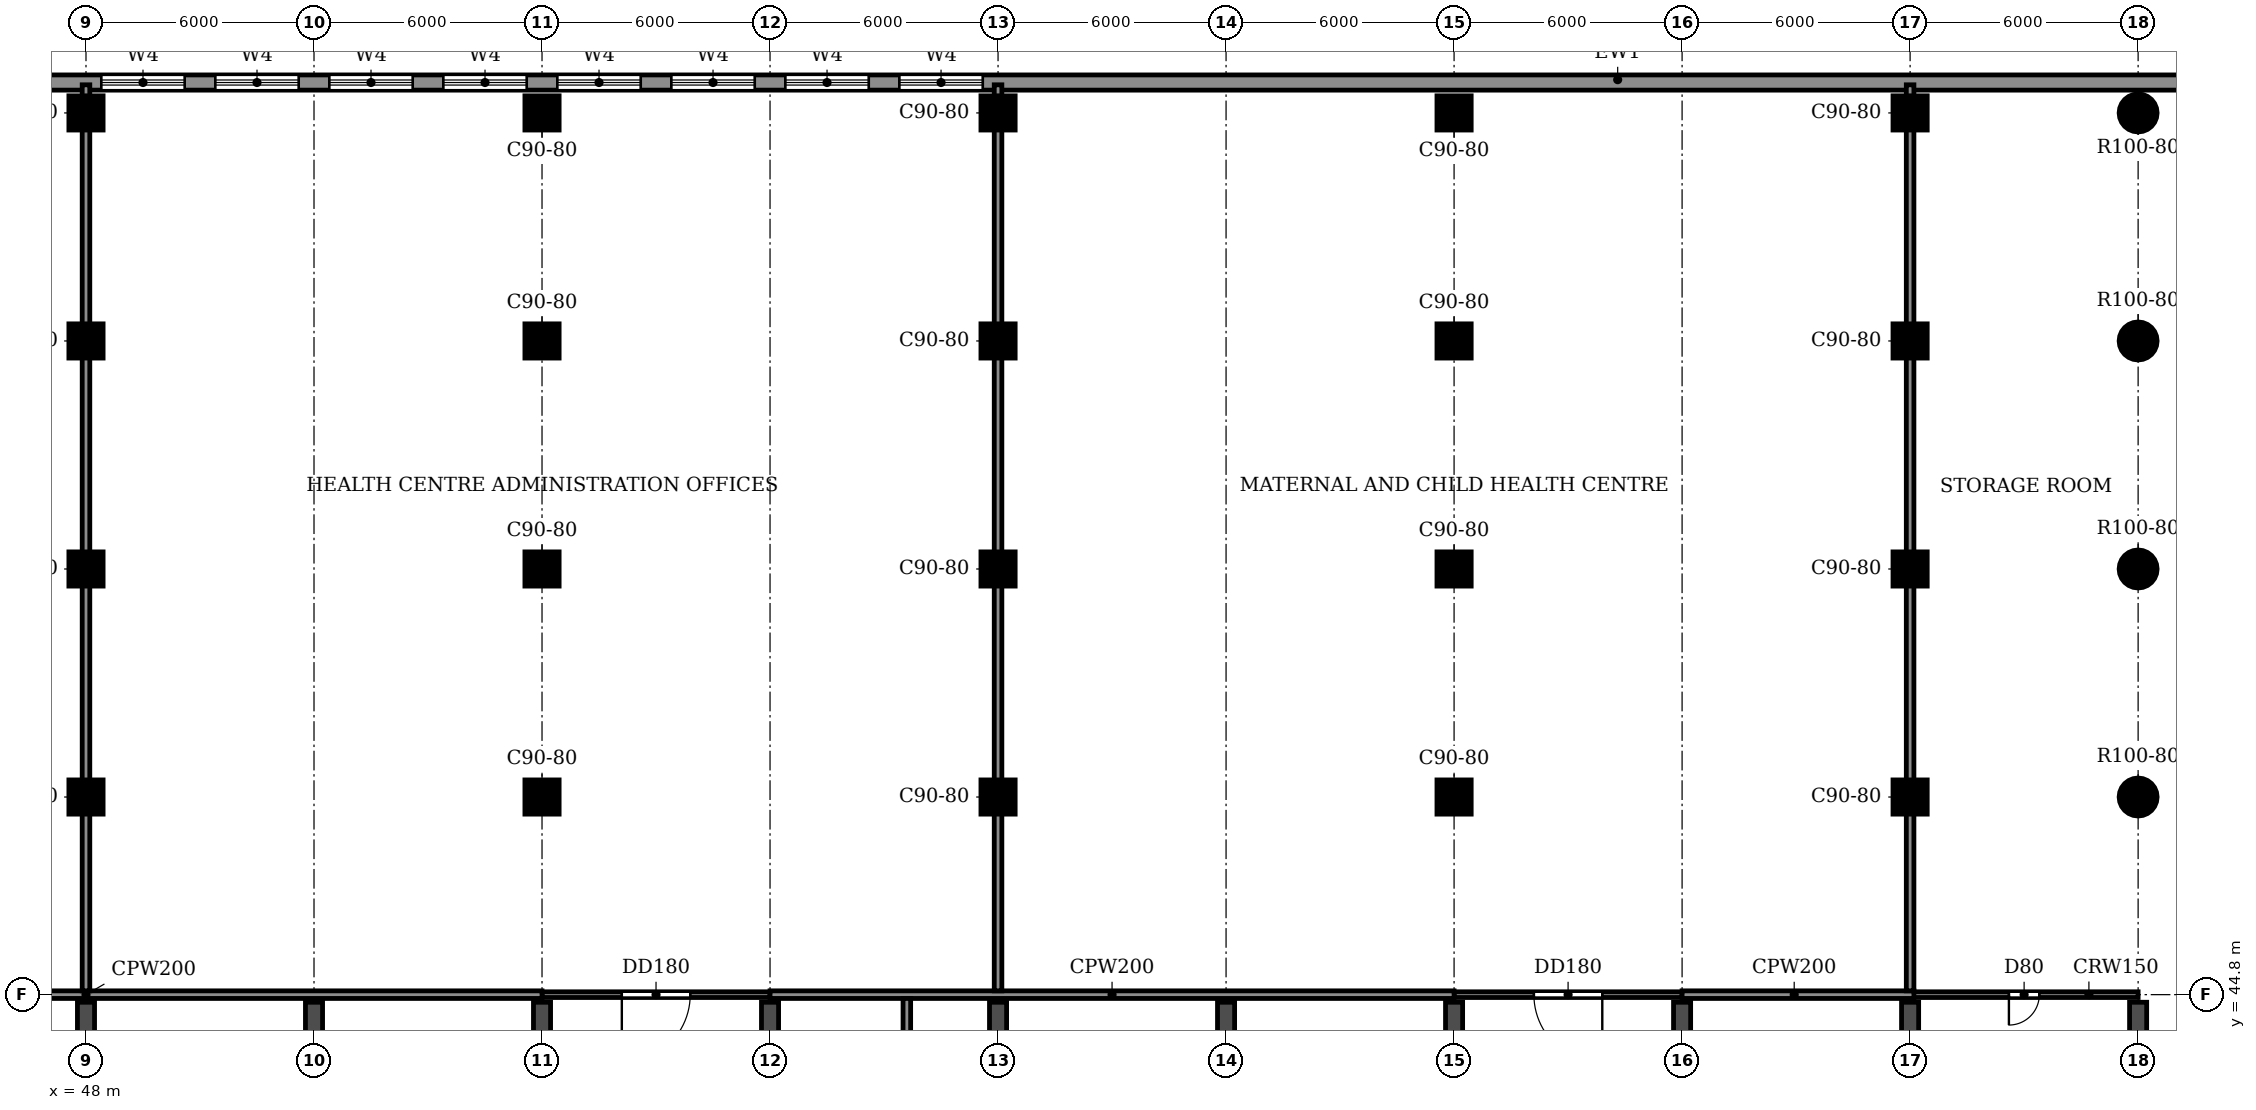
"""IFC4 building model, lengths in metres.
Left out: names, types, materials, properties, quantities, classifications, styles, units other than length and angle.
Written with IfcOpenShell. Run it as: python <this file> out.ifc"""

import sys

from ifc_helpers import new_model, si_unit, direction, frame, frame_2d, origin, origin_2d, place, context, subcontext, project, spatial, rectangle, circle, extrude, source, transform, mapped, element, fill, save


model = new_model("IFC4")
c1 = context("Model", 3, precision=1e-05, world=origin(), true_north=direction((0.0, 1.0)))
c2 = subcontext(c1, "Body", "Model", "MODEL_VIEW")
j1 = project(units=[si_unit("LENGTHUNIT", "METRE"), si_unit("PLANEANGLEUNIT", "RADIAN")], contexts=[c1])
p1 = place(None, origin())
s1 = spatial("IfcSite", under=j1, at=p1, CompositionType="ELEMENT")
p2 = place(p1, origin())
s2 = spatial("IfcBuilding", under=s1, at=p2, CompositionType="ELEMENT")
p3 = place(p2, frame((0.0, 0.0, 6.0)))
s3 = spatial("IfcBuildingStorey", under=s2, at=p3, CompositionType="ELEMENT", Elevation=6.0)
for number, where, z_axis, x_axis in (
    (1, (48.0, 30.55, 0.0), (0.0, 0.0, 1.0), (0.0, 1.0, 0.0)),
    (2, (54.0, 30.55, 0.0), (0.0, 0.0, 1.0), (0.0, 1.0, 0.0)),
    (3, (60.0, 30.55, 0.0), (0.0, 0.0, 1.0), (0.0, 1.0, 0.0)),
    (4, (66.0, 30.55, 0.0), (0.0, 0.0, 1.0), (0.0, 1.0, 0.0)),
    (5, (72.0, 30.55, 0.0), (0.0, 0.0, 1.0), (0.0, 1.0, 0.0)),
    (6, (78.0, 30.55, 0.0), (0.0, 0.0, 1.0), (0.0, 1.0, 0.0)),
    (7, (84.0, 30.55, 0.0), (0.0, 0.0, 1.0), (0.0, 1.0, 0.0)),
    (8, (90.0, 30.55, 0.0), (0.0, 0.0, 1.0), (0.0, 1.0, 0.0)),
    (9, (96.0, 30.55, 0.0), (0.0, 0.0, 1.0), (0.0, 1.0, 0.0)),
    (10, (102.0, 30.55, 0.0), (0.0, 0.0, 1.0), (0.0, 1.0, 0.0)),
):
    element("IfcWall", number, at=place(p3, frame(where, z_axis=z_axis, x_axis=x_axis)), inside=s3, PredefinedType="SHEAR", context=c2, shape_type="SweptSolid", body=[
        extrude(rectangle(XDim=14.05, YDim=0.45, at=frame_2d((7.025, 0.0))), origin(), (0.0, 0.0, 1.0), 4.52),
    ])
m1 = source(origin(), c2, "Body", "SweptSolid", [
    extrude(rectangle(XDim=0.9, YDim=0.9, at=origin_2d()), origin(), (0.0, 0.0, 1.0), 4.52),
])
for number, where, z_axis, x_axis in (
    (11, (48.0, 68.0, 0.0), (0.0, 0.0, 1.0), (1.0, 0.0, 0.0)),
    (12, (60.0, 68.0, 0.0), (0.0, 0.0, 1.0), (1.0, 0.0, 0.0)),
    (13, (72.0, 68.0, 0.0), (0.0, 0.0, 1.0), (1.0, 0.0, 0.0)),
    (14, (84.0, 68.0, 0.0), (0.0, 0.0, 1.0), (1.0, 0.0, 0.0)),
    (15, (96.0, 68.0, 0.0), (0.0, 0.0, 1.0), (1.0, 0.0, 0.0)),
):
    element("IfcColumn", number, at=place(p3, frame(where, z_axis=z_axis, x_axis=x_axis)), inside=s3, PredefinedType="COLUMN", context=c2, shape_type="MappedRepresentation", body=[
        mapped(m1, transform((0.0, 0.0, 0.0))),
    ])
m2 = source(origin(), c2, "Body", "SweptSolid", [
    extrude(circle(Radius=0.5, at=origin_2d()), origin(), (0.0, 0.0, 1.0), 4.52),
])
p4 = place(p3, frame((102.0, 68.0, 0.0), z_axis=(0.0, 0.0, 1.0), x_axis=(1.0, 0.0, 0.0)))
e16 = element("IfcColumn", 16, at=p4, inside=s3, PredefinedType="COLUMN", context=c2, shape_type="MappedRepresentation", body=[
    mapped(m2, transform((0.0, 0.0, 0.0))),
])
for number, where, z_axis, x_axis in (
    (17, (48.0, 62.0, 0.0), (0.0, 0.0, 1.0), (1.0, 0.0, 0.0)),
    (18, (60.0, 62.0, 0.0), (0.0, 0.0, 1.0), (1.0, 0.0, 0.0)),
    (19, (72.0, 62.0, 0.0), (0.0, 0.0, 1.0), (1.0, 0.0, 0.0)),
    (20, (84.0, 62.0, 0.0), (0.0, 0.0, 1.0), (1.0, 0.0, 0.0)),
    (21, (96.0, 62.0, 0.0), (0.0, 0.0, 1.0), (1.0, 0.0, 0.0)),
):
    element("IfcColumn", number, at=place(p3, frame(where, z_axis=z_axis, x_axis=x_axis)), inside=s3, PredefinedType="COLUMN", context=c2, shape_type="MappedRepresentation", body=[
        mapped(m1, transform((0.0, 0.0, 0.0))),
    ])
p5 = place(p3, frame((102.0, 62.0, 0.0), z_axis=(0.0, 0.0, 1.0), x_axis=(1.0, 0.0, 0.0)))
e22 = element("IfcColumn", 22, at=p5, inside=s3, PredefinedType="COLUMN", context=c2, shape_type="MappedRepresentation", body=[
    mapped(m2, transform((0.0, 0.0, 0.0))),
])
for number, where, z_axis, x_axis in (
    (23, (48.0, 56.0, 0.0), (0.0, 0.0, 1.0), (1.0, 0.0, 0.0)),
    (24, (60.0, 56.0, 0.0), (0.0, 0.0, 1.0), (1.0, 0.0, 0.0)),
    (25, (72.0, 56.0, 0.0), (0.0, 0.0, 1.0), (1.0, 0.0, 0.0)),
    (26, (84.0, 56.0, 0.0), (0.0, 0.0, 1.0), (1.0, 0.0, 0.0)),
    (27, (96.0, 56.0, 0.0), (0.0, 0.0, 1.0), (1.0, 0.0, 0.0)),
):
    element("IfcColumn", number, at=place(p3, frame(where, z_axis=z_axis, x_axis=x_axis)), inside=s3, PredefinedType="COLUMN", context=c2, shape_type="MappedRepresentation", body=[
        mapped(m1, transform((0.0, 0.0, 0.0))),
    ])
p6 = place(p3, frame((102.0, 56.0, 0.0), z_axis=(0.0, 0.0, 1.0), x_axis=(1.0, 0.0, 0.0)))
e28 = element("IfcColumn", 28, at=p6, inside=s3, PredefinedType="COLUMN", context=c2, shape_type="MappedRepresentation", body=[
    mapped(m2, transform((0.0, 0.0, 0.0))),
])
for number, where, z_axis, x_axis in (
    (29, (48.0, 50.0, 0.0), (0.0, 0.0, 1.0), (1.0, 0.0, 0.0)),
    (30, (60.0, 50.0, 0.0), (0.0, 0.0, 1.0), (1.0, 0.0, 0.0)),
    (31, (72.0, 50.0, 0.0), (0.0, 0.0, 1.0), (1.0, 0.0, 0.0)),
    (32, (84.0, 50.0, 0.0), (0.0, 0.0, 1.0), (1.0, 0.0, 0.0)),
    (33, (96.0, 50.0, 0.0), (0.0, 0.0, 1.0), (1.0, 0.0, 0.0)),
):
    element("IfcColumn", number, at=place(p3, frame(where, z_axis=z_axis, x_axis=x_axis)), inside=s3, PredefinedType="COLUMN", context=c2, shape_type="MappedRepresentation", body=[
        mapped(m1, transform((0.0, 0.0, 0.0))),
    ])
p7 = place(p3, frame((102.0, 50.0, 0.0), z_axis=(0.0, 0.0, 1.0), x_axis=(1.0, 0.0, 0.0)))
e34 = element("IfcColumn", 34, at=p7, inside=s3, PredefinedType="COLUMN", context=c2, shape_type="MappedRepresentation", body=[
    mapped(m2, transform((0.0, 0.0, 0.0))),
])
p8 = place(p3, frame((105.0, 68.8, 0.0), z_axis=(0.0, 0.0, 1.0), x_axis=(-1.0, 0.0, 0.0)))
e35 = element("IfcWall", 35, at=p8, inside=s3, PredefinedType="STANDARD", context=c2, shape_type="SweptSolid", body=[
    extrude(rectangle(XDim=60.0, YDim=0.4, at=frame_2d((30.0, 0.0))), origin(), (0.0, 0.0, 1.0), 4.52),
])
p9 = place(p8, frame((54.4, 0.0, 0.9)))
e36 = element("IfcOpeningElement", 36, at=p9, cuts=e35, PredefinedType="OPENING", context=c2, shape_type="SweptSolid", body=[
    extrude(rectangle(XDim=2.2, YDim=2.7, at=frame_2d((1.1, 1.35))), frame((0.0, 0.21, 0.0), z_axis=(0.0, -1.0, 0.0), x_axis=(1.0, 0.0, 0.0)), (0.0, 0.0, 1.0), 0.42),
])
p10 = place(p8, frame((51.4, 0.0, 0.9)))
e37 = element("IfcOpeningElement", 37, at=p10, cuts=e35, PredefinedType="OPENING", context=c2, shape_type="SweptSolid", body=[
    extrude(rectangle(XDim=2.2, YDim=2.7, at=frame_2d((1.1, 1.35))), frame((0.0, 0.21, 0.0), z_axis=(0.0, -1.0, 0.0), x_axis=(1.0, 0.0, 0.0)), (0.0, 0.0, 1.0), 0.42),
])
p11 = place(p8, frame((48.4, 0.0, 0.9)))
e38 = element("IfcOpeningElement", 38, at=p11, cuts=e35, PredefinedType="OPENING", context=c2, shape_type="SweptSolid", body=[
    extrude(rectangle(XDim=2.2, YDim=2.7, at=frame_2d((1.1, 1.35))), frame((0.0, 0.21, 0.0), z_axis=(0.0, -1.0, 0.0), x_axis=(1.0, 0.0, 0.0)), (0.0, 0.0, 1.0), 0.42),
])
p12 = place(p8, frame((45.4, 0.0, 0.9)))
e39 = element("IfcOpeningElement", 39, at=p12, cuts=e35, PredefinedType="OPENING", context=c2, shape_type="SweptSolid", body=[
    extrude(rectangle(XDim=2.2, YDim=2.7, at=frame_2d((1.1, 1.35))), frame((0.0, 0.21, 0.0), z_axis=(0.0, -1.0, 0.0), x_axis=(1.0, 0.0, 0.0)), (0.0, 0.0, 1.0), 0.42),
])
p13 = place(p8, frame((42.4, 0.0, 0.9)))
e40 = element("IfcOpeningElement", 40, at=p13, cuts=e35, PredefinedType="OPENING", context=c2, shape_type="SweptSolid", body=[
    extrude(rectangle(XDim=2.2, YDim=2.7, at=frame_2d((1.1, 1.35))), frame((0.0, 0.21, 0.0), z_axis=(0.0, -1.0, 0.0), x_axis=(1.0, 0.0, 0.0)), (0.0, 0.0, 1.0), 0.42),
])
p14 = place(p8, frame((39.4, 0.0, 0.9)))
e41 = element("IfcOpeningElement", 41, at=p14, cuts=e35, PredefinedType="OPENING", context=c2, shape_type="SweptSolid", body=[
    extrude(rectangle(XDim=2.2, YDim=2.7, at=frame_2d((1.1, 1.35))), frame((0.0, 0.21, 0.0), z_axis=(0.0, -1.0, 0.0), x_axis=(1.0, 0.0, 0.0)), (0.0, 0.0, 1.0), 0.42),
])
p15 = place(p8, frame((36.4, 0.0, 0.9)))
e42 = element("IfcOpeningElement", 42, at=p15, cuts=e35, PredefinedType="OPENING", context=c2, shape_type="SweptSolid", body=[
    extrude(rectangle(XDim=2.2, YDim=2.7, at=frame_2d((1.1, 1.35))), frame((0.0, 0.21, 0.0), z_axis=(0.0, -1.0, 0.0), x_axis=(1.0, 0.0, 0.0)), (0.0, 0.0, 1.0), 0.42),
])
p16 = place(p8, frame((33.4, 0.0, 0.9)))
e43 = element("IfcOpeningElement", 43, at=p16, cuts=e35, PredefinedType="OPENING", context=c2, shape_type="SweptSolid", body=[
    extrude(rectangle(XDim=2.2, YDim=2.7, at=frame_2d((1.1, 1.35))), frame((0.0, 0.21, 0.0), z_axis=(0.0, -1.0, 0.0), x_axis=(1.0, 0.0, 0.0)), (0.0, 0.0, 1.0), 0.42),
])
p17 = place(p3, frame((60.0, 44.8, 0.0), z_axis=(0.0, 0.0, 1.0), x_axis=(1.0, 0.0, 0.0)))
e44 = element("IfcWall", 44, at=p17, inside=s3, PredefinedType="PARTITIONING", context=c2, shape_type="SweptSolid", body=[
    extrude(rectangle(XDim=6.0, YDim=0.15, at=frame_2d((3.0, 0.0))), origin(), (0.0, 0.0, 1.0), 4.52),
])
p18 = place(p17, frame((2.1, 0.0, 0.0)))
e45 = element("IfcOpeningElement", 45, at=p18, cuts=e44, PredefinedType="OPENING", context=c2, shape_type="SweptSolid", body=[
    extrude(rectangle(XDim=1.8, YDim=2.1, at=frame_2d((0.9, 1.05))), frame((0.0, 0.085, 0.0), z_axis=(0.0, -1.0, 0.0), x_axis=(1.0, 0.0, 0.0)), (0.0, 0.0, 1.0), 0.17),
])
p19 = place(p3, frame((84.0, 44.8, 0.0), z_axis=(0.0, 0.0, 1.0), x_axis=(1.0, 0.0, 0.0)))
e46 = element("IfcWall", 46, at=p19, inside=s3, PredefinedType="PARTITIONING", context=c2, shape_type="SweptSolid", body=[
    extrude(rectangle(XDim=6.0, YDim=0.15, at=frame_2d((3.0, 0.0))), origin(), (0.0, 0.0, 1.0), 4.52),
])
p20 = place(p19, frame((2.1, 0.0, 0.0)))
e47 = element("IfcOpeningElement", 47, at=p20, cuts=e46, PredefinedType="OPENING", context=c2, shape_type="SweptSolid", body=[
    extrude(rectangle(XDim=1.8, YDim=2.1, at=frame_2d((0.9, 1.05))), frame((0.0, 0.085, 0.0), z_axis=(0.0, -1.0, 0.0), x_axis=(1.0, 0.0, 0.0)), (0.0, 0.0, 1.0), 0.17),
])
p21 = place(p3, frame((95.9, 44.8, 0.0), z_axis=(0.0, 0.0, 1.0), x_axis=(1.0, 0.0, 0.0)))
e48 = element("IfcWall", 48, at=p21, inside=s3, PredefinedType="PARTITIONING", context=c2, shape_type="SweptSolid", body=[
    extrude(rectangle(XDim=6.1, YDim=0.15, at=frame_2d((3.05, 0.0))), origin(), (0.0, 0.0, 1.0), 4.52),
])
p22 = place(p21, frame((2.7, 0.0, 0.0)))
e49 = element("IfcOpeningElement", 49, at=p22, cuts=e48, PredefinedType="OPENING", context=c2, shape_type="SweptSolid", body=[
    extrude(rectangle(XDim=0.8, YDim=2.1, at=frame_2d((0.4, 1.05))), frame((0.0, 0.085, 0.0), z_axis=(0.0, -1.0, 0.0), x_axis=(1.0, 0.0, 0.0)), (0.0, 0.0, 1.0), 0.17),
])
p23 = place(p3, frame((36.0, 44.8, 0.0), z_axis=(0.0, 0.0, 1.0), x_axis=(1.0, 0.0, 0.0)))
e50 = element("IfcWall", 50, at=p23, inside=s3, PredefinedType="PARTITIONING", context=c2, shape_type="SweptSolid", body=[
    extrude(rectangle(XDim=24.0, YDim=0.2, at=frame_2d((12.0, 0.0))), origin(), (0.0, 0.0, 1.0), 4.52),
])
p24 = place(p3, frame((66.0, 44.8, 0.0), z_axis=(0.0, 0.0, 1.0), x_axis=(1.0, 0.0, 0.0)))
e51 = element("IfcWall", 51, at=p24, inside=s3, PredefinedType="PARTITIONING", context=c2, shape_type="SweptSolid", body=[
    extrude(rectangle(XDim=18.0, YDim=0.2, at=frame_2d((9.0, 0.0))), origin(), (0.0, 0.0, 1.0), 4.52),
])
p25 = place(p3, frame((90.0, 44.8, 0.0), z_axis=(0.0, 0.0, 1.0), x_axis=(1.0, 0.0, 0.0)))
e52 = element("IfcWall", 52, at=p25, inside=s3, PredefinedType="PARTITIONING", context=c2, shape_type="SweptSolid", body=[
    extrude(rectangle(XDim=6.1, YDim=0.2, at=frame_2d((3.05, 0.0))), origin(), (0.0, 0.0, 1.0), 4.52),
])
p26 = place(p3, frame((48.0, 44.9, 0.0), z_axis=(0.0, 0.0, 1.0), x_axis=(0.0, 1.0, 0.0)))
e53 = element("IfcWall", 53, at=p26, inside=s3, PredefinedType="PARTITIONING", context=c2, shape_type="SweptSolid", body=[
    extrude(rectangle(XDim=23.84, YDim=0.2, at=frame_2d((11.92, 0.0))), origin(), (0.0, 0.0, 1.0), 4.52),
])
p27 = place(p3, frame((69.6, 32.875, 0.0), z_axis=(0.0, 0.0, 1.0), x_axis=(0.0, 1.0, 0.0)))
e54 = element("IfcWall", 54, at=p27, inside=s3, PredefinedType="PARTITIONING", context=c2, shape_type="SweptSolid", body=[
    extrude(rectangle(XDim=11.825, YDim=0.2, at=frame_2d((5.913, 0.0))), origin(), (0.0, 0.0, 1.0), 4.52),
])
for number, where, z_axis, x_axis in (
    (55, (72.0, 44.9, 0.0), (0.0, 0.0, 1.0), (0.0, 1.0, 0.0)),
    (56, (96.0, 44.9, 0.0), (0.0, 0.0, 1.0), (0.0, 1.0, 0.0)),
):
    element("IfcWall", number, at=place(p3, frame(where, z_axis=z_axis, x_axis=x_axis)), inside=s3, PredefinedType="PARTITIONING", context=c2, shape_type="SweptSolid", body=[
        extrude(rectangle(XDim=23.84, YDim=0.2, at=frame_2d((11.92, 0.0))), origin(), (0.0, 0.0, 1.0), 4.52),
    ])
p28 = place(p9, origin())
e57 = element("IfcWindow", 57, at=p28, inside=s3, PartitioningType="DOUBLE_PANEL_HORIZONTAL", PredefinedType="WINDOW", context=c2, shape_type="SweptSolid", body=[
    extrude(rectangle(XDim=2.2, YDim=2.7, at=frame_2d((1.1, 1.35))), frame((0.0, 0.03, 0.0), z_axis=(0.0, -1.0, 0.0), x_axis=(1.0, 0.0, 0.0)), (0.0, 0.0, 1.0), 0.06),
])
fill(e36, e57)
p29 = place(p10, origin())
e58 = element("IfcWindow", 58, at=p29, inside=s3, PartitioningType="DOUBLE_PANEL_HORIZONTAL", PredefinedType="WINDOW", context=c2, shape_type="SweptSolid", body=[
    extrude(rectangle(XDim=2.2, YDim=2.7, at=frame_2d((1.1, 1.35))), frame((0.0, 0.03, 0.0), z_axis=(0.0, -1.0, 0.0), x_axis=(1.0, 0.0, 0.0)), (0.0, 0.0, 1.0), 0.06),
])
fill(e37, e58)
p30 = place(p11, origin())
e59 = element("IfcWindow", 59, at=p30, inside=s3, PartitioningType="DOUBLE_PANEL_HORIZONTAL", PredefinedType="WINDOW", context=c2, shape_type="SweptSolid", body=[
    extrude(rectangle(XDim=2.2, YDim=2.7, at=frame_2d((1.1, 1.35))), frame((0.0, 0.03, 0.0), z_axis=(0.0, -1.0, 0.0), x_axis=(1.0, 0.0, 0.0)), (0.0, 0.0, 1.0), 0.06),
])
fill(e38, e59)
p31 = place(p12, origin())
e60 = element("IfcWindow", 60, at=p31, inside=s3, PartitioningType="DOUBLE_PANEL_HORIZONTAL", PredefinedType="WINDOW", context=c2, shape_type="SweptSolid", body=[
    extrude(rectangle(XDim=2.2, YDim=2.7, at=frame_2d((1.1, 1.35))), frame((0.0, 0.03, 0.0), z_axis=(0.0, -1.0, 0.0), x_axis=(1.0, 0.0, 0.0)), (0.0, 0.0, 1.0), 0.06),
])
fill(e39, e60)
p32 = place(p13, origin())
e61 = element("IfcWindow", 61, at=p32, inside=s3, PartitioningType="DOUBLE_PANEL_HORIZONTAL", PredefinedType="WINDOW", context=c2, shape_type="SweptSolid", body=[
    extrude(rectangle(XDim=2.2, YDim=2.7, at=frame_2d((1.1, 1.35))), frame((0.0, 0.03, 0.0), z_axis=(0.0, -1.0, 0.0), x_axis=(1.0, 0.0, 0.0)), (0.0, 0.0, 1.0), 0.06),
])
fill(e40, e61)
p33 = place(p14, origin())
e62 = element("IfcWindow", 62, at=p33, inside=s3, PartitioningType="DOUBLE_PANEL_HORIZONTAL", PredefinedType="WINDOW", context=c2, shape_type="SweptSolid", body=[
    extrude(rectangle(XDim=2.2, YDim=2.7, at=frame_2d((1.1, 1.35))), frame((0.0, 0.03, 0.0), z_axis=(0.0, -1.0, 0.0), x_axis=(1.0, 0.0, 0.0)), (0.0, 0.0, 1.0), 0.06),
])
fill(e41, e62)
p34 = place(p15, origin())
e63 = element("IfcWindow", 63, at=p34, inside=s3, PartitioningType="DOUBLE_PANEL_HORIZONTAL", PredefinedType="WINDOW", context=c2, shape_type="SweptSolid", body=[
    extrude(rectangle(XDim=2.2, YDim=2.7, at=frame_2d((1.1, 1.35))), frame((0.0, 0.03, 0.0), z_axis=(0.0, -1.0, 0.0), x_axis=(1.0, 0.0, 0.0)), (0.0, 0.0, 1.0), 0.06),
])
fill(e42, e63)
p35 = place(p16, origin())
e64 = element("IfcWindow", 64, at=p35, inside=s3, PartitioningType="DOUBLE_PANEL_HORIZONTAL", PredefinedType="WINDOW", context=c2, shape_type="SweptSolid", body=[
    extrude(rectangle(XDim=2.2, YDim=2.7, at=frame_2d((1.1, 1.35))), frame((0.0, 0.03, 0.0), z_axis=(0.0, -1.0, 0.0), x_axis=(1.0, 0.0, 0.0)), (0.0, 0.0, 1.0), 0.06),
])
fill(e43, e64)
p36 = place(p18, frame((1.8, 0.0, 0.0), z_axis=(0.0, 0.0, 1.0), x_axis=(-1.0, 0.0, 0.0)))
e65 = element("IfcDoor", 65, at=p36, inside=s3, OperationType="DOUBLE_DOOR_SINGLE_SWING", PredefinedType="DOOR", context=c2, shape_type="SweptSolid", body=[
    extrude(rectangle(XDim=1.8, YDim=2.1, at=frame_2d((0.9, 1.05))), frame((0.0, 0.025, 0.0), z_axis=(0.0, -1.0, 0.0), x_axis=(1.0, 0.0, 0.0)), (0.0, 0.0, 1.0), 0.05),
])
fill(e45, e65)
p37 = place(p20, frame((1.8, 0.0, 0.0), z_axis=(0.0, 0.0, 1.0), x_axis=(-1.0, 0.0, 0.0)))
e66 = element("IfcDoor", 66, at=p37, inside=s3, OperationType="DOUBLE_DOOR_SINGLE_SWING", PredefinedType="DOOR", context=c2, shape_type="SweptSolid", body=[
    extrude(rectangle(XDim=1.8, YDim=2.1, at=frame_2d((0.9, 1.05))), frame((0.0, 0.025, 0.0), z_axis=(0.0, -1.0, 0.0), x_axis=(1.0, 0.0, 0.0)), (0.0, 0.0, 1.0), 0.05),
])
fill(e47, e66)
p38 = place(p22, frame((0.8, 0.0, 0.0), z_axis=(0.0, 0.0, 1.0), x_axis=(-1.0, 0.0, 0.0)))
e67 = element("IfcDoor", 67, at=p38, inside=s3, OperationType="SINGLE_SWING_RIGHT", PredefinedType="DOOR", context=c2, shape_type="SweptSolid", body=[
    extrude(rectangle(XDim=0.8, YDim=2.1, at=frame_2d((0.4, 1.05))), frame((0.0, 0.025, 0.0), z_axis=(0.0, -1.0, 0.0), x_axis=(1.0, 0.0, 0.0)), (0.0, 0.0, 1.0), 0.05),
])
fill(e49, e67)
save(model, sys.argv[1])
